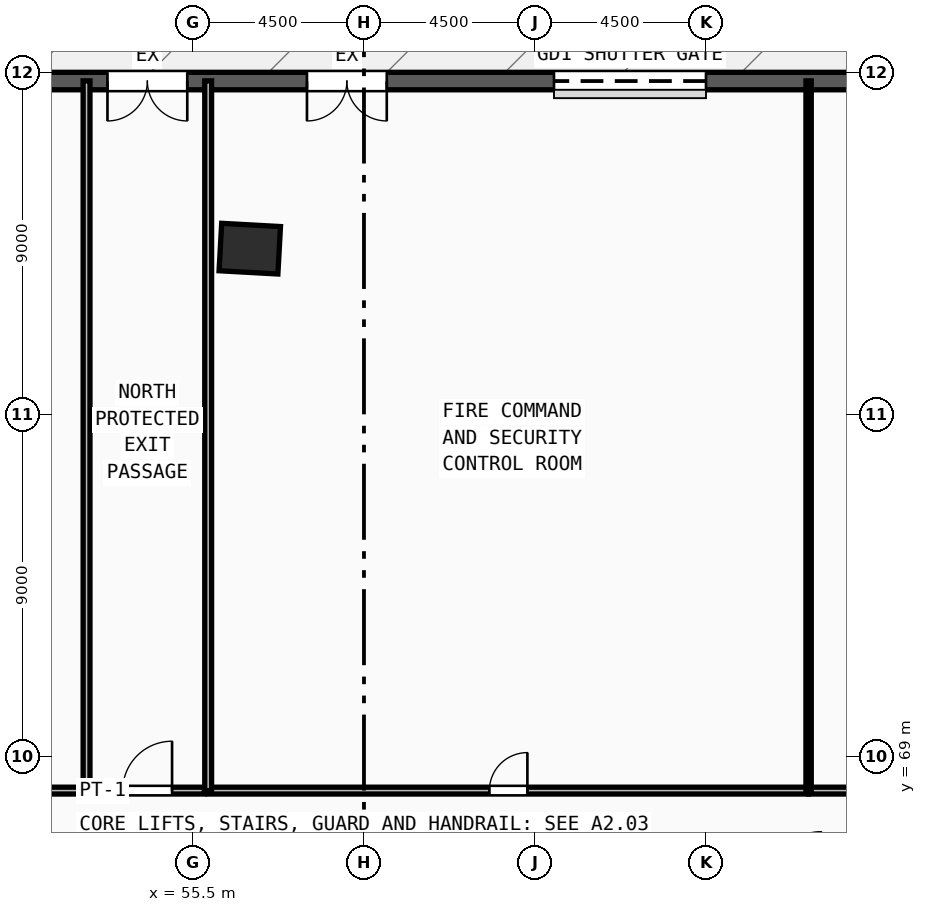
"""IFC4 building model, lengths in metres.
Left out: names, types, materials, properties, quantities, classifications, styles, units other than length and angle.
Written with IfcOpenShell. Run it as: python <this file> out.ifc"""

import sys

from ifc_helpers import new_model, si_unit, direction, frame, frame_2d, origin, origin_2d, place, context, subcontext, project, spatial, rectangle, extrude, source, transform, mapped, element, fill, save


model = new_model("IFC4")
c1 = context("Model", 3, precision=1e-05, world=origin(), true_north=direction((0.0, 1.0)))
c2 = subcontext(c1, "Body", "Model", "MODEL_VIEW")
j1 = project(units=[si_unit("LENGTHUNIT", "METRE"), si_unit("PLANEANGLEUNIT", "RADIAN")], contexts=[c1])
p1 = place(None, origin())
s1 = spatial("IfcSite", under=j1, at=p1, CompositionType="ELEMENT")
p2 = place(p1, origin())
s2 = spatial("IfcBuilding", under=s1, at=p2, CompositionType="ELEMENT")
p3 = place(p2, origin())
s3 = spatial("IfcBuildingStorey", under=s2, at=p3, CompositionType="ELEMENT", Elevation=0.0)
m1 = source(origin(), c2, "Body", "SweptSolid", [
    extrude(rectangle(XDim=1.55, YDim=1.25, at=origin_2d()), origin(), (0.0, 0.0, 1.0), 5.4),
])
p4 = place(p3, frame((56.995, 82.36, 0.0), z_axis=(0.0, 0.0, 1.0), x_axis=(-0.998479491627, 0.055124448298, 0.0)))
e1 = element("IfcColumn", 1, at=p4, inside=s3, PredefinedType="COLUMN", context=c2, shape_type="MappedRepresentation", body=[
    mapped(m1, transform((0.0, 0.0, 0.0), x_axis=(1.0, 0.0, 0.0), y_axis=(0.0, 1.0, 0.0), z_axis=(0.0, 0.0, 1.0), scale=1.0)),
])
p5 = place(p3, frame((104.77, 86.77, 0.0), z_axis=(0.0, 0.0, 1.0), x_axis=(-1.0, 0.0, 0.0)))
e2 = element("IfcWall", 2, at=p5, inside=s3, PredefinedType="SOLIDWALL", context=c2, shape_type="SweptSolid", body=[
    extrude(rectangle(XDim=89.54, YDim=0.46, at=frame_2d((44.77, 0.0))), origin(), (0.0, 0.0, 1.0), 5.15),
])
m2 = source(origin(), c2, "Body", "SweptSolid", [
    extrude(rectangle(XDim=2.1, YDim=2.4, at=frame_2d((1.05, 1.2))), frame((0.0, 0.24, 0.0), z_axis=(0.0, -1.0, 0.0), x_axis=(1.0, 0.0, 0.0)), (0.0, 0.0, 1.0), 0.48),
])
p6 = place(p5, frame((49.42, 0.0, 0.0)))
e3 = element("IfcOpeningElement", 3, at=p6, cuts=e2, PredefinedType="OPENING", context=c2, shape_type="MappedRepresentation", body=[
    mapped(m2, transform((0.0, 0.0, 0.0), x_axis=(1.0, 0.0, 0.0), y_axis=(0.0, 1.0, 0.0), z_axis=(0.0, 0.0, 1.0), scale=1.0)),
])
p7 = place(p5, frame((83.17, 0.0, 0.0)))
e4 = element("IfcOpeningElement", 4, at=p7, cuts=e2, PredefinedType="OPENING", context=c2, shape_type="MappedRepresentation", body=[
    mapped(m2, transform((0.0, 0.0, 0.0), x_axis=(1.0, 0.0, 0.0), y_axis=(0.0, 1.0, 0.0), z_axis=(0.0, 0.0, 1.0), scale=1.0)),
])
p8 = place(p5, frame((44.17, 0.0, 0.0)))
e5 = element("IfcOpeningElement", 5, at=p8, cuts=e2, PredefinedType="OPENING", context=c2, shape_type="MappedRepresentation", body=[
    mapped(m2, transform((0.0, 0.0, 0.0), x_axis=(1.0, 0.0, 0.0), y_axis=(0.0, 1.0, 0.0), z_axis=(0.0, 0.0, 1.0), scale=1.0)),
])
m3 = source(origin(), c2, "Body", "SweptSolid", [
    extrude(rectangle(XDim=4.0, YDim=3.8, at=frame_2d((2.0, 1.9))), frame((0.0, 0.24, 0.0), z_axis=(0.0, -1.0, 0.0), x_axis=(1.0, 0.0, 0.0)), (0.0, 0.0, 1.0), 0.48),
])
p9 = place(p5, frame((72.77, 0.0, 0.0)))
e6 = element("IfcOpeningElement", 6, at=p9, cuts=e2, PredefinedType="OPENING", context=c2, shape_type="MappedRepresentation", body=[
    mapped(m3, transform((0.0, 0.0, 0.0), x_axis=(1.0, 0.0, 0.0), y_axis=(0.0, 1.0, 0.0), z_axis=(0.0, 0.0, 1.0), scale=1.0)),
])
p10 = place(p5, frame((59.77, 0.0, 0.0)))
e7 = element("IfcOpeningElement", 7, at=p10, cuts=e2, PredefinedType="OPENING", context=c2, shape_type="MappedRepresentation", body=[
    mapped(m3, transform((0.0, 0.0, 0.0), x_axis=(1.0, 0.0, 0.0), y_axis=(0.0, 1.0, 0.0), z_axis=(0.0, 0.0, 1.0), scale=1.0)),
])
p11 = place(p5, frame((35.77, 0.0, 0.0)))
e8 = element("IfcOpeningElement", 8, at=p11, cuts=e2, PredefinedType="OPENING", context=c2, shape_type="MappedRepresentation", body=[
    mapped(m3, transform((0.0, 0.0, 0.0), x_axis=(1.0, 0.0, 0.0), y_axis=(0.0, 1.0, 0.0), z_axis=(0.0, 0.0, 1.0), scale=1.0)),
])
p12 = place(p5, frame((16.77, 0.0, 0.0)))
e9 = element("IfcOpeningElement", 9, at=p12, cuts=e2, PredefinedType="OPENING", context=c2, shape_type="MappedRepresentation", body=[
    mapped(m3, transform((0.0, 0.0, 0.0), x_axis=(1.0, 0.0, 0.0), y_axis=(0.0, 1.0, 0.0), z_axis=(0.0, 0.0, 1.0), scale=1.0)),
])
p13 = place(p5, frame((2.27, 0.0, 0.0)))
e10 = element("IfcOpeningElement", 10, at=p13, cuts=e2, PredefinedType="OPENING", context=c2, shape_type="MappedRepresentation", body=[
    mapped(m3, transform((0.0, 0.0, 0.0), x_axis=(1.0, 0.0, 0.0), y_axis=(0.0, 1.0, 0.0), z_axis=(0.0, 0.0, 1.0), scale=1.0)),
])
p14 = place(p3, frame((52.8, 68.1, 0.0), z_axis=(0.0, 0.0, 1.0), x_axis=(1.0, 0.0, 0.0)))
e11 = element("IfcWall", 11, at=p14, inside=s3, PredefinedType="PARTITIONING", context=c2, shape_type="SweptSolid", body=[
    extrude(rectangle(XDim=3.0, YDim=0.18, at=frame_2d((1.5, 0.0))), origin(), (0.0, 0.0, 1.0), 5.15),
])
m4 = source(origin(), c2, "Body", "SweptSolid", [
    extrude(rectangle(XDim=1.3, YDim=2.2, at=frame_2d((0.65, 1.1))), frame((0.0, 0.1, 0.0), z_axis=(0.0, -1.0, 0.0), x_axis=(1.0, 0.0, 0.0)), (0.0, 0.0, 1.0), 0.2),
])
p15 = place(p14, frame((0.85, 0.0, 0.0)))
e12 = element("IfcOpeningElement", 12, at=p15, cuts=e11, PredefinedType="OPENING", context=c2, shape_type="MappedRepresentation", body=[
    mapped(m4, transform((0.0, 0.0, 0.0), x_axis=(1.0, 0.0, 0.0), y_axis=(0.0, 1.0, 0.0), z_axis=(0.0, 0.0, 1.0), scale=1.0)),
])
p16 = place(p3, frame((55.9, 68.1, 0.0), z_axis=(0.0, 0.0, 1.0), x_axis=(1.0, 0.0, 0.0)))
e13 = element("IfcWall", 13, at=p16, inside=s3, PredefinedType="PARTITIONING", context=c2, shape_type="SweptSolid", body=[
    extrude(rectangle(XDim=15.8, YDim=0.18, at=frame_2d((7.9, 0.0))), origin(), (0.0, 0.0, 1.0), 5.15),
])
m5 = source(origin(), c2, "Body", "SweptSolid", [
    extrude(rectangle(XDim=1.0, YDim=2.2, at=frame_2d((0.5, 1.1))), frame((0.0, 0.1, 0.0), z_axis=(0.0, -1.0, 0.0), x_axis=(1.0, 0.0, 0.0)), (0.0, 0.0, 1.0), 0.2),
])
p17 = place(p16, frame((7.4, 0.0, 0.0)))
e14 = element("IfcOpeningElement", 14, at=p17, cuts=e13, PredefinedType="OPENING", context=c2, shape_type="MappedRepresentation", body=[
    mapped(m5, transform((0.0, 0.0, 0.0), x_axis=(1.0, 0.0, 0.0), y_axis=(0.0, 1.0, 0.0), z_axis=(0.0, 0.0, 1.0), scale=1.0)),
])
p18 = place(p3, frame((71.7, 68.1, 0.0), z_axis=(0.0, 0.0, 1.0), x_axis=(1.0, 0.0, 0.0)))
e15 = element("IfcWall", 15, at=p18, inside=s3, PredefinedType="PARTITIONING", context=c2, shape_type="SweptSolid", body=[
    extrude(rectangle(XDim=3.88, YDim=0.18, at=frame_2d((1.94, 0.0))), origin(), (0.0, 0.0, 1.0), 5.15),
])
p19 = place(p3, frame((48.3, 68.1, 0.0), z_axis=(0.0, 0.0, 1.0), x_axis=(1.0, 0.0, 0.0)))
e16 = element("IfcWall", 16, at=p19, inside=s3, PredefinedType="PARTITIONING", context=c2, shape_type="SweptSolid", body=[
    extrude(rectangle(XDim=4.4, YDim=0.18, at=frame_2d((2.2, 0.0))), origin(), (0.0, 0.0, 1.0), 5.15),
])
for number, where, z_axis, x_axis in (
    (17, (52.7, 68.1, 0.0), (0.0, 0.0, 1.0), (0.0, 1.0, 0.0)),
    (18, (55.9, 68.1, 0.0), (0.0, 0.0, 1.0), (0.0, 1.0, 0.0)),
):
    element("IfcWall", number, at=place(p3, frame(where, z_axis=z_axis, x_axis=x_axis)), inside=s3, PredefinedType="PARTITIONING", context=c2, shape_type="SweptSolid", body=[
        extrude(rectangle(XDim=18.675, YDim=0.18, at=frame_2d((9.337, 0.0))), origin(), (0.0, 0.0, 1.0), 5.15),
    ])
p20 = place(p3, frame((71.7, 68.1, 0.0), z_axis=(0.0, 0.0, 1.0), x_axis=(0.0, 1.0, 0.0)))
e19 = element("IfcWall", 19, at=p20, inside=s3, PredefinedType="PARTITIONING", context=c2, shape_type="SweptSolid", body=[
    extrude(rectangle(XDim=18.675, YDim=0.14, at=frame_2d((9.337, 0.0))), origin(), (0.0, 0.0, 1.0), 5.15),
])
m6 = source(origin(), c2, "Body", "SweptSolid", [
    extrude(rectangle(XDim=2.1, YDim=2.4, at=frame_2d((1.05, 1.2))), frame((0.0, 0.025, 0.0), z_axis=(0.0, -1.0, 0.0), x_axis=(1.0, 0.0, 0.0)), (0.0, 0.0, 1.0), 0.05),
])
p21 = place(p6, frame((2.1, 0.0, 0.0), z_axis=(0.0, 0.0, 1.0), x_axis=(-1.0, 0.0, 0.0)))
e20 = element("IfcDoor", 20, at=p21, inside=s3, OperationType="DOUBLE_DOOR_SINGLE_SWING", PredefinedType="DOOR", context=c2, shape_type="MappedRepresentation", body=[
    mapped(m6, transform((0.0, 0.0, 0.0), x_axis=(1.0, 0.0, 0.0), y_axis=(0.0, 1.0, 0.0), z_axis=(0.0, 0.0, 1.0), scale=1.0)),
])
fill(e3, e20)
p22 = place(p8, frame((2.1, 0.0, 0.0), z_axis=(0.0, 0.0, 1.0), x_axis=(-1.0, 0.0, 0.0)))
e21 = element("IfcDoor", 21, at=p22, inside=s3, OperationType="DOUBLE_DOOR_SINGLE_SWING", PredefinedType="DOOR", context=c2, shape_type="MappedRepresentation", body=[
    mapped(m6, transform((0.0, 0.0, 0.0), x_axis=(1.0, 0.0, 0.0), y_axis=(0.0, 1.0, 0.0), z_axis=(0.0, 0.0, 1.0), scale=1.0)),
])
fill(e5, e21)
m7 = source(origin(), c2, "Body", "SweptSolid", [
    extrude(rectangle(XDim=4.0, YDim=3.8, at=frame_2d((2.0, 1.9))), frame((0.0, 0.025, 0.0), z_axis=(0.0, -1.0, 0.0), x_axis=(1.0, 0.0, 0.0)), (0.0, 0.0, 1.0), 0.05),
])
p23 = place(p11, origin())
e22 = element("IfcDoor", 22, at=p23, inside=s3, OperationType="ROLLINGUP", PredefinedType="GATE", context=c2, shape_type="MappedRepresentation", body=[
    mapped(m7, transform((0.0, 0.0, 0.0), x_axis=(1.0, 0.0, 0.0), y_axis=(0.0, 1.0, 0.0), z_axis=(0.0, 0.0, 1.0), scale=1.0)),
])
fill(e8, e22)
m8 = source(origin(), c2, "Body", "SweptSolid", [
    extrude(rectangle(XDim=1.3, YDim=2.2, at=frame_2d((0.65, 1.1))), frame((0.0, 0.025, 0.0), z_axis=(0.0, -1.0, 0.0), x_axis=(1.0, 0.0, 0.0)), (0.0, 0.0, 1.0), 0.05),
])
p24 = place(p15, origin())
e23 = element("IfcDoor", 23, at=p24, inside=s3, OperationType="SINGLE_SWING_RIGHT", PredefinedType="DOOR", context=c2, shape_type="MappedRepresentation", body=[
    mapped(m8, transform((0.0, 0.0, 0.0), x_axis=(1.0, 0.0, 0.0), y_axis=(0.0, 1.0, 0.0), z_axis=(0.0, 0.0, 1.0), scale=1.0)),
])
fill(e12, e23)
m9 = source(origin(), c2, "Body", "SweptSolid", [
    extrude(rectangle(XDim=1.0, YDim=2.2, at=frame_2d((0.5, 1.1))), frame((0.0, 0.025, 0.0), z_axis=(0.0, -1.0, 0.0), x_axis=(1.0, 0.0, 0.0)), (0.0, 0.0, 1.0), 0.05),
])
p25 = place(p17, origin())
e24 = element("IfcDoor", 24, at=p25, inside=s3, OperationType="SINGLE_SWING_RIGHT", PredefinedType="DOOR", context=c2, shape_type="MappedRepresentation", body=[
    mapped(m9, transform((0.0, 0.0, 0.0), x_axis=(1.0, 0.0, 0.0), y_axis=(0.0, 1.0, 0.0), z_axis=(0.0, 0.0, 1.0), scale=1.0)),
])
fill(e14, e24)
save(model, sys.argv[1])
